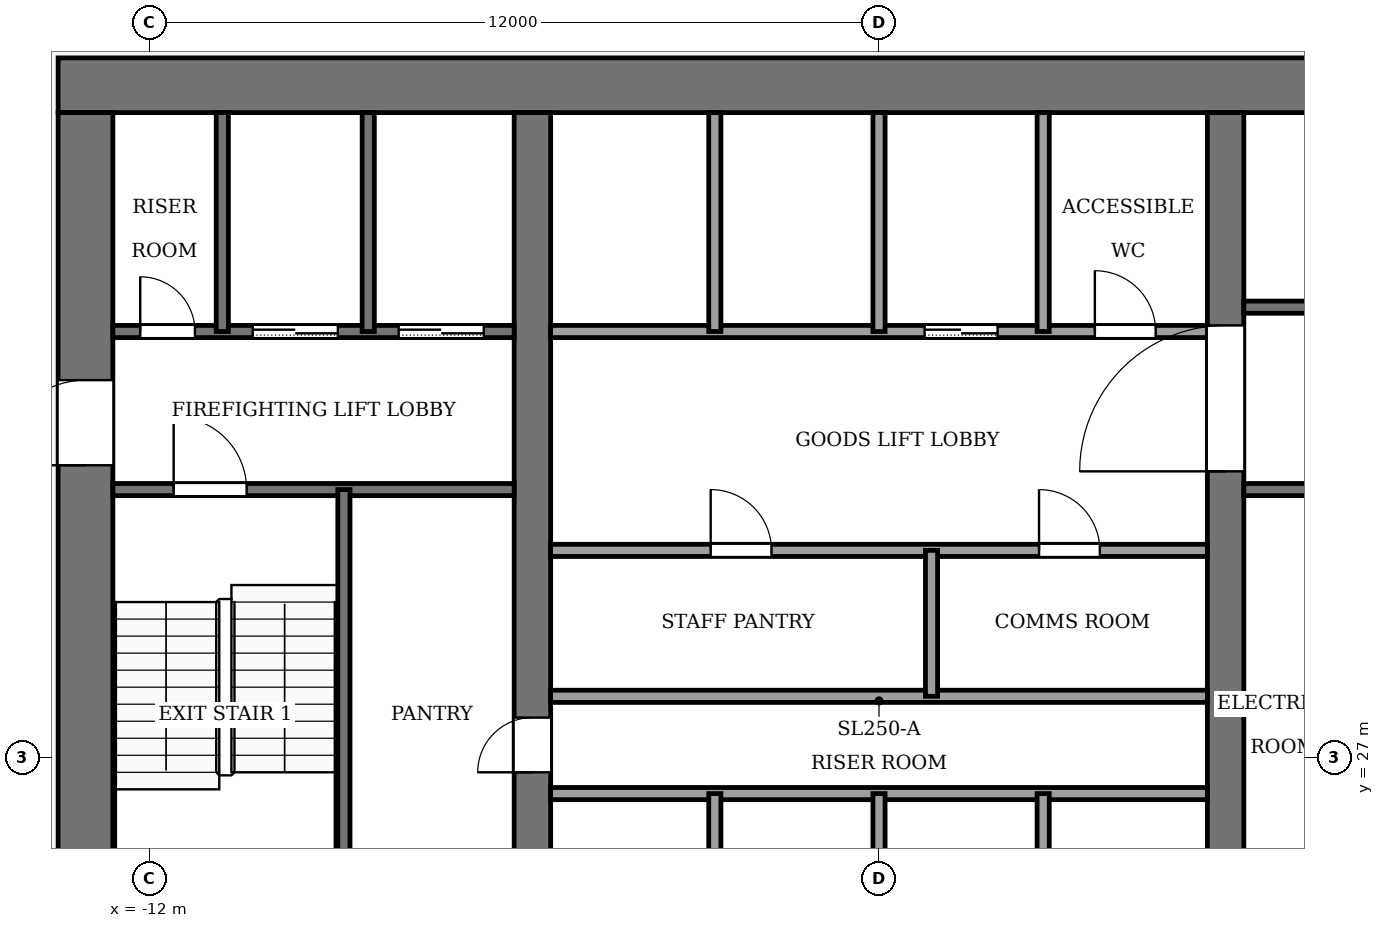
"""IFC4 building model, lengths in metres.
Left out: names, types, materials, properties, quantities, classifications, styles, units other than length and angle.
Written with IfcOpenShell. Run it as: python <this file> out.ifc"""

import sys

from ifc_helpers import new_model, si_unit, direction, frame, frame_2d, origin, place, context, subcontext, project, spatial, rectangle, extrude, element, fill, save


model = new_model("IFC4")
c1 = context("Model", 3, precision=1e-05, world=origin(), true_north=direction((0.0, 1.0)))
c2 = subcontext(c1, "Body", "Model", "MODEL_VIEW")
j1 = project(units=[si_unit("LENGTHUNIT", "METRE"), si_unit("PLANEANGLEUNIT", "RADIAN")], contexts=[c1])
p1 = place(None, origin())
s1 = spatial("IfcSite", under=j1, at=p1, CompositionType="ELEMENT")
p2 = place(p1, origin())
s2 = spatial("IfcBuilding", under=s1, at=p2, CompositionType="ELEMENT")
p3 = place(p2, frame((0.0, 0.0, 194.0)))
s3 = spatial("IfcBuildingStorey", under=s2, at=p3, CompositionType="ELEMENT", Elevation=194.0)
p4 = place(p3, frame((-13.5, 38.05, -0.13), z_axis=(0.0, 0.0, 1.0), x_axis=(1.0, 0.0, 0.0)))
e1 = element("IfcWall", 1, at=p4, inside=s3, PredefinedType="SHEAR", context=c2, shape_type="SweptSolid", body=[
    extrude(rectangle(XDim=27.0, YDim=0.9, at=frame_2d((13.5, 0.0))), origin(), (0.0, 0.0, 1.0), 4.0),
])
p5 = place(p3, frame((-13.05, 18.4, -0.13), z_axis=(0.0, 0.0, 1.0), x_axis=(0.0, 1.0, 0.0)))
e2 = element("IfcWall", 2, at=p5, inside=s3, PredefinedType="SHEAR", context=c2, shape_type="SweptSolid", body=[
    extrude(rectangle(XDim=19.2, YDim=0.9, at=frame_2d((9.6, 0.0))), origin(), (0.0, 0.0, 1.0), 4.0),
])
p6 = place(p5, frame((2.8, 0.0, 0.13)))
e3 = element("IfcOpeningElement", 3, at=p6, cuts=e2, PredefinedType="OPENING", context=c2, shape_type="SweptSolid", body=[
    extrude(rectangle(XDim=2.4, YDim=2.4, at=frame_2d((1.2, 1.2))), frame((0.0, 0.46, 0.0), z_axis=(0.0, -1.0, 0.0), x_axis=(1.0, 0.0, 0.0)), (0.0, 0.0, 1.0), 0.92),
])
p7 = place(p5, frame((13.4, 0.0, 0.13)))
e4 = element("IfcOpeningElement", 4, at=p7, cuts=e2, PredefinedType="OPENING", context=c2, shape_type="SweptSolid", body=[
    extrude(rectangle(XDim=1.4, YDim=2.2, at=frame_2d((0.7, 1.1))), frame((0.0, 0.46, 0.0), z_axis=(0.0, -1.0, 0.0), x_axis=(1.0, 0.0, 0.0)), (0.0, 0.0, 1.0), 0.92),
])
p8 = place(p3, frame((-5.7, 18.4, -0.13), z_axis=(0.0, 0.0, 1.0), x_axis=(0.0, 1.0, 0.0)))
e5 = element("IfcWall", 5, at=p8, inside=s3, PredefinedType="SHEAR", context=c2, shape_type="SweptSolid", body=[
    extrude(rectangle(XDim=19.2, YDim=0.6, at=frame_2d((9.6, 0.0))), origin(), (0.0, 0.0, 1.0), 4.0),
])
p9 = place(p8, frame((8.35, 0.0, 0.13)))
e6 = element("IfcOpeningElement", 6, at=p9, cuts=e5, PredefinedType="OPENING", context=c2, shape_type="SweptSolid", body=[
    extrude(rectangle(XDim=0.9, YDim=2.1, at=frame_2d((0.45, 1.05))), frame((0.0, 0.31, 0.0), z_axis=(0.0, -1.0, 0.0), x_axis=(1.0, 0.0, 0.0)), (0.0, 0.0, 1.0), 0.62),
])
p10 = place(p3, frame((5.7, 18.4, -0.13), z_axis=(0.0, 0.0, 1.0), x_axis=(0.0, 1.0, 0.0)))
e7 = element("IfcWall", 7, at=p10, inside=s3, PredefinedType="SHEAR", context=c2, shape_type="SweptSolid", body=[
    extrude(rectangle(XDim=19.2, YDim=0.6, at=frame_2d((9.6, 0.0))), origin(), (0.0, 0.0, 1.0), 4.0),
])
p11 = place(p10, frame((13.3, 0.0, 0.13)))
e8 = element("IfcOpeningElement", 8, at=p11, cuts=e7, PredefinedType="OPENING", context=c2, shape_type="SweptSolid", body=[
    extrude(rectangle(XDim=2.4, YDim=2.4, at=frame_2d((1.2, 1.2))), frame((0.0, 0.31, 0.0), z_axis=(0.0, -1.0, 0.0), x_axis=(1.0, 0.0, 0.0)), (0.0, 0.0, 1.0), 0.62),
])
for number, where, z_axis, x_axis in (
    (9, (-5.4, 26.4, 0.0), (0.0, 0.0, 1.0), (1.0, 0.0, 0.0)),
    (10, (-5.4, 28.0, 0.0), (0.0, 0.0, 1.0), (1.0, 0.0, 0.0)),
):
    element("IfcWall", number, at=place(p3, frame(where, z_axis=z_axis, x_axis=x_axis)), inside=s3, PredefinedType="PARTITIONING", context=c2, shape_type="SweptSolid", body=[
        extrude(rectangle(XDim=10.8, YDim=0.2, at=frame_2d((5.4, 0.0))), origin(), (0.0, 0.0, 1.0), 3.87),
    ])
p12 = place(p3, frame((-5.4, 30.4, 0.0), z_axis=(0.0, 0.0, 1.0), x_axis=(1.0, 0.0, 0.0)))
e11 = element("IfcWall", 11, at=p12, inside=s3, PredefinedType="PARTITIONING", context=c2, shape_type="SweptSolid", body=[
    extrude(rectangle(XDim=10.8, YDim=0.2, at=frame_2d((5.4, 0.0))), origin(), (0.0, 0.0, 1.0), 3.87),
])
p13 = place(p12, frame((2.632, 0.0, 0.0)))
e12 = element("IfcOpeningElement", 12, at=p13, cuts=e11, PredefinedType="OPENING", context=c2, shape_type="SweptSolid", body=[
    extrude(rectangle(XDim=1.0, YDim=2.1, at=frame_2d((0.5, 1.05))), frame((0.0, 0.11, 0.0), z_axis=(0.0, -1.0, 0.0), x_axis=(1.0, 0.0, 0.0)), (0.0, 0.0, 1.0), 0.22),
])
p14 = place(p12, frame((8.032, 0.0, 0.0)))
e13 = element("IfcOpeningElement", 13, at=p14, cuts=e11, PredefinedType="OPENING", context=c2, shape_type="SweptSolid", body=[
    extrude(rectangle(XDim=1.0, YDim=2.1, at=frame_2d((0.5, 1.05))), frame((0.0, 0.11, 0.0), z_axis=(0.0, -1.0, 0.0), x_axis=(1.0, 0.0, 0.0)), (0.0, 0.0, 1.0), 0.22),
])
p15 = place(p3, frame((-12.6, 31.4, 0.0), z_axis=(0.0, 0.0, 1.0), x_axis=(1.0, 0.0, 0.0)))
e14 = element("IfcWall", 14, at=p15, inside=s3, PredefinedType="PARTITIONING", context=c2, shape_type="SweptSolid", body=[
    extrude(rectangle(XDim=6.6, YDim=0.2, at=frame_2d((3.3, 0.0))), origin(), (0.0, 0.0, 1.0), 3.87),
])
p16 = place(p15, frame((1.0, 0.0, 0.0)))
e15 = element("IfcOpeningElement", 15, at=p16, cuts=e14, PredefinedType="OPENING", context=c2, shape_type="SweptSolid", body=[
    extrude(rectangle(XDim=1.2, YDim=2.2, at=frame_2d((0.6, 1.1))), frame((0.0, 0.11, 0.0), z_axis=(0.0, -1.0, 0.0), x_axis=(1.0, 0.0, 0.0)), (0.0, 0.0, 1.0), 0.22),
])
p17 = place(p3, frame((6.0, 31.4, 0.0), z_axis=(0.0, 0.0, 1.0), x_axis=(1.0, 0.0, 0.0)))
e16 = element("IfcWall", 16, at=p17, inside=s3, PredefinedType="PARTITIONING", context=c2, shape_type="SweptSolid", body=[
    extrude(rectangle(XDim=6.6, YDim=0.2, at=frame_2d((3.3, 0.0))), origin(), (0.0, 0.0, 1.0), 3.87),
])
p18 = place(p3, frame((-12.6, 34.0, 0.0), z_axis=(0.0, 0.0, 1.0), x_axis=(1.0, 0.0, 0.0)))
e17 = element("IfcWall", 17, at=p18, inside=s3, PredefinedType="PARTITIONING", context=c2, shape_type="SweptSolid", body=[
    extrude(rectangle(XDim=6.6, YDim=0.2, at=frame_2d((3.3, 0.0))), origin(), (0.0, 0.0, 1.0), 3.87),
])
p19 = place(p18, frame((4.7, 0.0, 0.0)))
e18 = element("IfcOpeningElement", 18, at=p19, cuts=e17, PredefinedType="OPENING", context=c2, shape_type="SweptSolid", body=[
    extrude(rectangle(XDim=1.4, YDim=2.2, at=frame_2d((0.7, 1.1))), frame((0.0, 0.11, 0.0), z_axis=(0.0, -1.0, 0.0), x_axis=(1.0, 0.0, 0.0)), (0.0, 0.0, 1.0), 0.22),
])
p20 = place(p18, frame((2.3, 0.0, 0.0)))
e19 = element("IfcOpeningElement", 19, at=p20, cuts=e17, PredefinedType="OPENING", context=c2, shape_type="SweptSolid", body=[
    extrude(rectangle(XDim=1.4, YDim=2.2, at=frame_2d((0.7, 1.1))), frame((0.0, 0.11, 0.0), z_axis=(0.0, -1.0, 0.0), x_axis=(1.0, 0.0, 0.0)), (0.0, 0.0, 1.0), 0.22),
])
p21 = place(p18, frame((0.45, 0.0, 0.0)))
e20 = element("IfcOpeningElement", 20, at=p21, cuts=e17, PredefinedType="OPENING", context=c2, shape_type="SweptSolid", body=[
    extrude(rectangle(XDim=0.9, YDim=2.1, at=frame_2d((0.45, 1.05))), frame((0.0, 0.11, 0.0), z_axis=(0.0, -1.0, 0.0), x_axis=(1.0, 0.0, 0.0)), (0.0, 0.0, 1.0), 0.22),
])
p22 = place(p3, frame((-5.4, 34.0, 0.0), z_axis=(0.0, 0.0, 1.0), x_axis=(1.0, 0.0, 0.0)))
e21 = element("IfcWall", 21, at=p22, inside=s3, PredefinedType="PARTITIONING", context=c2, shape_type="SweptSolid", body=[
    extrude(rectangle(XDim=10.8, YDim=0.2, at=frame_2d((5.4, 0.0))), origin(), (0.0, 0.0, 1.0), 3.87),
])
p23 = place(p22, frame((6.15, 0.0, 0.0)))
e22 = element("IfcOpeningElement", 22, at=p23, cuts=e21, PredefinedType="OPENING", context=c2, shape_type="SweptSolid", body=[
    extrude(rectangle(XDim=1.2, YDim=2.2, at=frame_2d((0.6, 1.1))), frame((0.0, 0.11, 0.0), z_axis=(0.0, -1.0, 0.0), x_axis=(1.0, 0.0, 0.0)), (0.0, 0.0, 1.0), 0.22),
])
p24 = place(p22, frame((8.95, 0.0, 0.0)))
e23 = element("IfcOpeningElement", 23, at=p24, cuts=e21, PredefinedType="OPENING", context=c2, shape_type="SweptSolid", body=[
    extrude(rectangle(XDim=1.0, YDim=2.1, at=frame_2d((0.5, 1.05))), frame((0.0, 0.11, 0.0), z_axis=(0.0, -1.0, 0.0), x_axis=(1.0, 0.0, 0.0)), (0.0, 0.0, 1.0), 0.22),
])
p25 = place(p3, frame((6.0, 34.4, 0.0), z_axis=(0.0, 0.0, 1.0), x_axis=(1.0, 0.0, 0.0)))
e24 = element("IfcWall", 24, at=p25, inside=s3, PredefinedType="PARTITIONING", context=c2, shape_type="SweptSolid", body=[
    extrude(rectangle(XDim=6.6, YDim=0.2, at=frame_2d((3.3, 0.0))), origin(), (0.0, 0.0, 1.0), 3.87),
])
p26 = place(p25, frame((4.8, 0.0, 0.0)))
e25 = element("IfcOpeningElement", 25, at=p26, cuts=e24, PredefinedType="OPENING", context=c2, shape_type="SweptSolid", body=[
    extrude(rectangle(XDim=1.2, YDim=2.2, at=frame_2d((0.6, 1.1))), frame((0.0, 0.11, 0.0), z_axis=(0.0, -1.0, 0.0), x_axis=(1.0, 0.0, 0.0)), (0.0, 0.0, 1.0), 0.22),
])
p27 = place(p3, frame((-10.8, 34.0, 0.0), z_axis=(0.0, 0.0, 1.0), x_axis=(0.0, 1.0, 0.0)))
e26 = element("IfcWall", 26, at=p27, inside=s3, PredefinedType="PARTITIONING", context=c2, shape_type="SweptSolid", body=[
    extrude(rectangle(XDim=3.6, YDim=0.2, at=frame_2d((1.8, 0.0))), origin(), (0.0, 0.0, 1.0), 3.87),
])
p28 = place(p3, frame((-8.8, 24.0, 0.0), z_axis=(0.0, 0.0, 1.0), x_axis=(0.0, 1.0, 0.0)))
e27 = element("IfcWall", 27, at=p28, inside=s3, PredefinedType="PARTITIONING", context=c2, shape_type="SweptSolid", body=[
    extrude(rectangle(XDim=7.4, YDim=0.2, at=frame_2d((3.7, 0.0))), origin(), (0.0, 0.0, 1.0), 3.87),
])
p29 = place(p3, frame((-8.4, 34.0, 0.0), z_axis=(0.0, 0.0, 1.0), x_axis=(0.0, 1.0, 0.0)))
e28 = element("IfcWall", 28, at=p29, inside=s3, PredefinedType="PARTITIONING", context=c2, shape_type="SweptSolid", body=[
    extrude(rectangle(XDim=3.6, YDim=0.2, at=frame_2d((1.8, 0.0))), origin(), (0.0, 0.0, 1.0), 3.87),
])
p30 = place(p3, frame((-2.7, 24.0, 0.0), z_axis=(0.0, 0.0, 1.0), x_axis=(0.0, 1.0, 0.0)))
e29 = element("IfcWall", 29, at=p30, inside=s3, PredefinedType="PARTITIONING", context=c2, shape_type="SweptSolid", body=[
    extrude(rectangle(XDim=2.4, YDim=0.2, at=frame_2d((1.2, 0.0))), origin(), (0.0, 0.0, 1.0), 3.87),
])
p31 = place(p3, frame((-2.7, 34.0, 0.0), z_axis=(0.0, 0.0, 1.0), x_axis=(0.0, 1.0, 0.0)))
e30 = element("IfcWall", 30, at=p31, inside=s3, PredefinedType="PARTITIONING", context=c2, shape_type="SweptSolid", body=[
    extrude(rectangle(XDim=3.6, YDim=0.2, at=frame_2d((1.8, 0.0))), origin(), (0.0, 0.0, 1.0), 3.87),
])
p32 = place(p3, frame((0.0, 24.0, 0.0), z_axis=(0.0, 0.0, 1.0), x_axis=(0.0, 1.0, 0.0)))
e31 = element("IfcWall", 31, at=p32, inside=s3, PredefinedType="PARTITIONING", context=c2, shape_type="SweptSolid", body=[
    extrude(rectangle(XDim=2.4, YDim=0.2, at=frame_2d((1.2, 0.0))), origin(), (0.0, 0.0, 1.0), 3.87),
])
p33 = place(p3, frame((0.0, 34.0, 0.0), z_axis=(0.0, 0.0, 1.0), x_axis=(0.0, 1.0, 0.0)))
e32 = element("IfcWall", 32, at=p33, inside=s3, PredefinedType="PARTITIONING", context=c2, shape_type="SweptSolid", body=[
    extrude(rectangle(XDim=3.6, YDim=0.2, at=frame_2d((1.8, 0.0))), origin(), (0.0, 0.0, 1.0), 3.87),
])
for number, where, z_axis, x_axis in (
    (33, (0.864, 28.0, 0.0), (0.0, 0.0, 1.0), (0.0, 1.0, 0.0)),
    (34, (2.7, 24.0, 0.0), (0.0, 0.0, 1.0), (0.0, 1.0, 0.0)),
):
    element("IfcWall", number, at=place(p3, frame(where, z_axis=z_axis, x_axis=x_axis)), inside=s3, PredefinedType="PARTITIONING", context=c2, shape_type="SweptSolid", body=[
        extrude(rectangle(XDim=2.4, YDim=0.2, at=frame_2d((1.2, 0.0))), origin(), (0.0, 0.0, 1.0), 3.87),
    ])
p34 = place(p3, frame((2.7, 34.0, 0.0), z_axis=(0.0, 0.0, 1.0), x_axis=(0.0, 1.0, 0.0)))
e35 = element("IfcWall", 35, at=p34, inside=s3, PredefinedType="PARTITIONING", context=c2, shape_type="SweptSolid", body=[
    extrude(rectangle(XDim=3.6, YDim=0.2, at=frame_2d((1.8, 0.0))), origin(), (0.0, 0.0, 1.0), 3.87),
])
p35 = place(p23, origin())
e36 = element("IfcDoor", 36, at=p35, inside=s3, OperationType="SLIDING_TO_LEFT", PredefinedType="DOOR", context=c2, shape_type="SweptSolid", body=[
    extrude(rectangle(XDim=1.2, YDim=2.2, at=frame_2d((0.6, 1.1))), frame((0.0, 0.025, 0.0), z_axis=(0.0, -1.0, 0.0), x_axis=(1.0, 0.0, 0.0)), (0.0, 0.0, 1.0), 0.05),
])
fill(e22, e36)
p36 = place(p19, origin())
e37 = element("IfcDoor", 37, at=p36, inside=s3, OperationType="SLIDING_TO_LEFT", PredefinedType="DOOR", context=c2, shape_type="SweptSolid", body=[
    extrude(rectangle(XDim=1.4, YDim=2.2, at=frame_2d((0.7, 1.1))), frame((0.0, 0.025, 0.0), z_axis=(0.0, -1.0, 0.0), x_axis=(1.0, 0.0, 0.0)), (0.0, 0.0, 1.0), 0.05),
])
fill(e18, e37)
p37 = place(p20, origin())
e38 = element("IfcDoor", 38, at=p37, inside=s3, OperationType="SLIDING_TO_LEFT", PredefinedType="DOOR", context=c2, shape_type="SweptSolid", body=[
    extrude(rectangle(XDim=1.4, YDim=2.2, at=frame_2d((0.7, 1.1))), frame((0.0, 0.025, 0.0), z_axis=(0.0, -1.0, 0.0), x_axis=(1.0, 0.0, 0.0)), (0.0, 0.0, 1.0), 0.05),
])
fill(e19, e38)
p38 = place(p21, origin())
e39 = element("IfcDoor", 39, at=p38, inside=s3, OperationType="SINGLE_SWING_RIGHT", PredefinedType="DOOR", context=c2, shape_type="SweptSolid", body=[
    extrude(rectangle(XDim=0.9, YDim=2.1, at=frame_2d((0.45, 1.05))), frame((0.0, 0.025, 0.0), z_axis=(0.0, -1.0, 0.0), x_axis=(1.0, 0.0, 0.0)), (0.0, 0.0, 1.0), 0.05),
])
fill(e20, e39)
p39 = place(p13, origin())
e40 = element("IfcDoor", 40, at=p39, inside=s3, OperationType="SINGLE_SWING_LEFT", PredefinedType="DOOR", context=c2, shape_type="SweptSolid", body=[
    extrude(rectangle(XDim=1.0, YDim=2.1, at=frame_2d((0.5, 1.05))), frame((0.0, 0.025, 0.0), z_axis=(0.0, -1.0, 0.0), x_axis=(1.0, 0.0, 0.0)), (0.0, 0.0, 1.0), 0.05),
])
fill(e12, e40)
p40 = place(p14, origin())
e41 = element("IfcDoor", 41, at=p40, inside=s3, OperationType="SINGLE_SWING_RIGHT", PredefinedType="DOOR", context=c2, shape_type="SweptSolid", body=[
    extrude(rectangle(XDim=1.0, YDim=2.1, at=frame_2d((0.5, 1.05))), frame((0.0, 0.025, 0.0), z_axis=(0.0, -1.0, 0.0), x_axis=(1.0, 0.0, 0.0)), (0.0, 0.0, 1.0), 0.05),
])
fill(e13, e41)
p41 = place(p24, origin())
e42 = element("IfcDoor", 42, at=p41, inside=s3, OperationType="SINGLE_SWING_LEFT", PredefinedType="DOOR", context=c2, shape_type="SweptSolid", body=[
    extrude(rectangle(XDim=1.0, YDim=2.1, at=frame_2d((0.5, 1.05))), frame((0.0, 0.025, 0.0), z_axis=(0.0, -1.0, 0.0), x_axis=(1.0, 0.0, 0.0)), (0.0, 0.0, 1.0), 0.05),
])
fill(e23, e42)
p42 = place(p9, origin())
e43 = element("IfcDoor", 43, at=p42, inside=s3, OperationType="SINGLE_SWING_RIGHT", PredefinedType="DOOR", context=c2, shape_type="SweptSolid", body=[
    extrude(rectangle(XDim=0.9, YDim=2.1, at=frame_2d((0.45, 1.05))), frame((0.0, 0.025, 0.0), z_axis=(0.0, -1.0, 0.0), x_axis=(1.0, 0.0, 0.0)), (0.0, 0.0, 1.0), 0.05),
])
fill(e6, e43)
p43 = place(p16, origin())
e44 = element("IfcDoor", 44, at=p43, inside=s3, OperationType="SINGLE_SWING_RIGHT", PredefinedType="DOOR", context=c2, shape_type="SweptSolid", body=[
    extrude(rectangle(XDim=1.2, YDim=2.2, at=frame_2d((0.6, 1.1))), frame((0.0, 0.025, 0.0), z_axis=(0.0, -1.0, 0.0), x_axis=(1.0, 0.0, 0.0)), (0.0, 0.0, 1.0), 0.05),
])
fill(e15, e44)
p44 = place(p11, origin())
e45 = element("IfcDoor", 45, at=p44, inside=s3, OperationType="DOUBLE_DOOR_SINGLE_SWING", PredefinedType="DOOR", context=c2, shape_type="SweptSolid", body=[
    extrude(rectangle(XDim=2.4, YDim=2.4, at=frame_2d((1.2, 1.2))), frame((0.0, 0.025, 0.0), z_axis=(0.0, -1.0, 0.0), x_axis=(1.0, 0.0, 0.0)), (0.0, 0.0, 1.0), 0.05),
])
fill(e8, e45)
p45 = place(p7, origin())
e46 = element("IfcDoor", 46, at=p45, inside=s3, OperationType="SINGLE_SWING_RIGHT", PredefinedType="DOOR", context=c2, shape_type="SweptSolid", body=[
    extrude(rectangle(XDim=1.4, YDim=2.2, at=frame_2d((0.7, 1.1))), frame((0.0, 0.025, 0.0), z_axis=(0.0, -1.0, 0.0), x_axis=(1.0, 0.0, 0.0)), (0.0, 0.0, 1.0), 0.05),
])
fill(e4, e46)
save(model, sys.argv[1])
